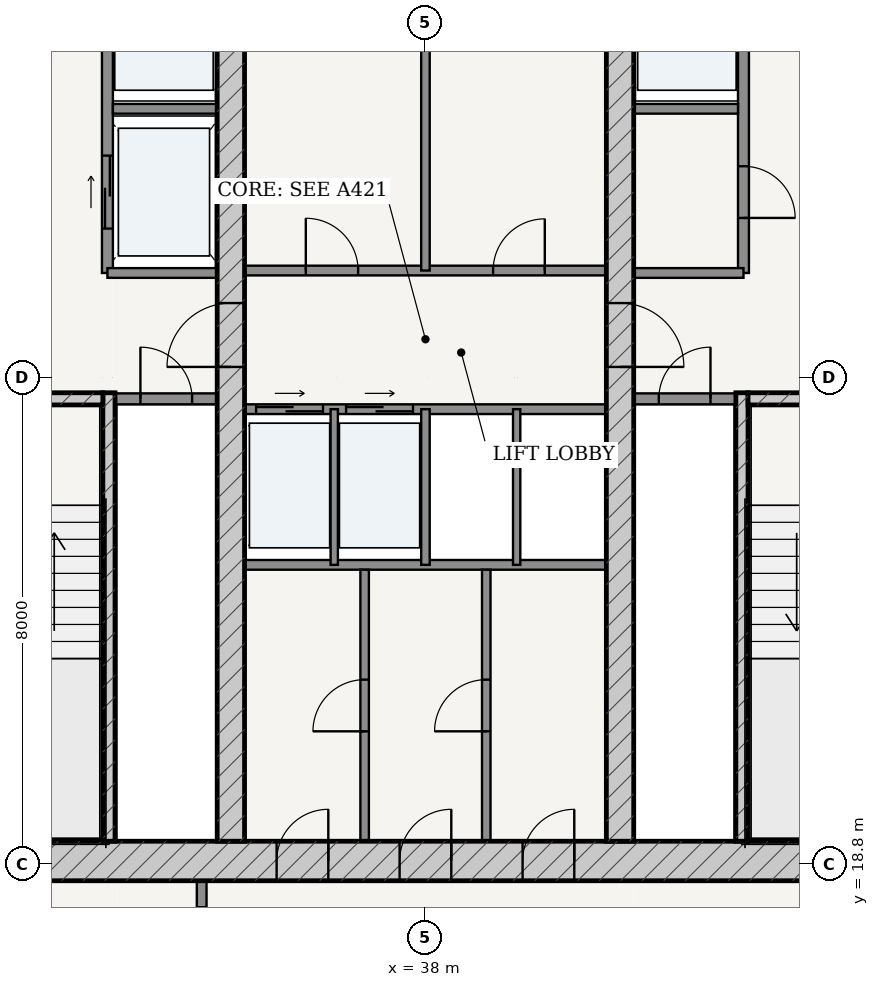
"""IFC4 building model, lengths in metres.
Left out: names, types, materials, properties, quantities, classifications, styles, units other than length and angle.
Written with IfcOpenShell. Run it as: python <this file> out.ifc"""

import sys

from ifc_helpers import new_model, si_unit, direction, frame, frame_2d, origin, place, context, subcontext, project, spatial, rectangle, extrude, source, transform, mapped, element, fill, save


model = new_model("IFC4")
c1 = context("Model", 3, precision=1e-05, world=origin(), true_north=direction((-0.2419218956, 0.970295726276)))
c2 = subcontext(c1, "Body", "Model", "MODEL_VIEW")
j1 = project(units=[si_unit("LENGTHUNIT", "METRE"), si_unit("PLANEANGLEUNIT", "RADIAN")], contexts=[c1])
p1 = place(None, origin())
s1 = spatial("IfcSite", under=j1, at=p1, CompositionType="ELEMENT")
p2 = place(p1, origin())
s2 = spatial("IfcBuilding", under=s1, at=p2, CompositionType="ELEMENT")
p3 = place(p2, frame((0.0, 0.0, 139.0)))
s3 = spatial("IfcBuildingStorey", under=s2, at=p3, CompositionType="ELEMENT", Elevation=139.0)
p4 = place(p3, frame((28.725, 18.85, 0.0), z_axis=(0.0, 0.0, 1.0), x_axis=(1.0, 0.0, 0.0)))
e1 = element("IfcWall", 1, at=p4, inside=s3, PredefinedType="SHEAR", context=c2, shape_type="SweptSolid", body=[
    extrude(rectangle(XDim=18.55, YDim=0.65, at=frame_2d((9.275, 0.0))), origin(), (0.0, 0.0, 1.0), 3.33),
])
p5 = place(p4, frame((6.827, 0.0, 0.0)))
e2 = element("IfcOpeningElement", 2, at=p5, cuts=e1, PredefinedType="OPENING", context=c2, shape_type="SweptSolid", body=[
    extrude(rectangle(XDim=0.85, YDim=2.1, at=frame_2d((0.425, 1.05))), frame((0.0, 0.335, 0.0), z_axis=(0.0, -1.0, 0.0), x_axis=(1.0, 0.0, 0.0)), (0.0, 0.0, 1.0), 0.67),
])
p6 = place(p4, frame((8.85, 0.0, 0.0)))
e3 = element("IfcOpeningElement", 3, at=p6, cuts=e1, PredefinedType="OPENING", context=c2, shape_type="SweptSolid", body=[
    extrude(rectangle(XDim=0.85, YDim=2.1, at=frame_2d((0.425, 1.05))), frame((0.0, 0.335, 0.0), z_axis=(0.0, -1.0, 0.0), x_axis=(1.0, 0.0, 0.0)), (0.0, 0.0, 1.0), 0.67),
])
p7 = place(p4, frame((10.873, 0.0, 0.0)))
e4 = element("IfcOpeningElement", 4, at=p7, cuts=e1, PredefinedType="OPENING", context=c2, shape_type="SweptSolid", body=[
    extrude(rectangle(XDim=0.85, YDim=2.1, at=frame_2d((0.425, 1.05))), frame((0.0, 0.335, 0.0), z_axis=(0.0, -1.0, 0.0), x_axis=(1.0, 0.0, 0.0)), (0.0, 0.0, 1.0), 0.67),
])
p8 = place(p3, frame((32.795, 19.175, 0.0), z_axis=(0.0, 0.0, 1.0), x_axis=(0.0, 1.0, 0.0)))
e5 = element("IfcWall", 5, at=p8, inside=s3, PredefinedType="SOLIDWALL", context=c2, shape_type="SweptSolid", body=[
    extrude(rectangle(XDim=7.375, YDim=0.2, at=frame_2d((3.688, 0.0))), origin(), (0.0, 0.0, 1.0), 3.33),
])
p9 = place(p3, frame((29.375, 26.45, 0.0), z_axis=(0.0, 0.0, 1.0), x_axis=(1.0, 0.0, 0.0)))
e6 = element("IfcWall", 6, at=p9, inside=s3, PredefinedType="SOLIDWALL", context=c2, shape_type="SweptSolid", body=[
    extrude(rectangle(XDim=3.32, YDim=0.2, at=frame_2d((1.66, 0.0))), origin(), (0.0, 0.0, 1.0), 3.33),
])
p10 = place(p9, frame((1.185, 0.0, 0.0)))
e7 = element("IfcOpeningElement", 7, at=p10, cuts=e6, PredefinedType="OPENING", context=c2, shape_type="SweptSolid", body=[
    extrude(rectangle(XDim=0.95, YDim=2.15, at=frame_2d((0.475, 1.075))), frame((0.0, 0.11, 0.0), z_axis=(0.0, -1.0, 0.0), x_axis=(1.0, 0.0, 0.0)), (0.0, 0.0, 1.0), 0.22),
])
p11 = place(p3, frame((43.205, 19.175, 0.0), z_axis=(0.0, 0.0, 1.0), x_axis=(0.0, 1.0, 0.0)))
e8 = element("IfcWall", 8, at=p11, inside=s3, PredefinedType="SOLIDWALL", context=c2, shape_type="SweptSolid", body=[
    extrude(rectangle(XDim=7.375, YDim=0.2, at=frame_2d((3.688, 0.0))), origin(), (0.0, 0.0, 1.0), 3.33),
])
p12 = place(p3, frame((43.305, 26.45, 0.0), z_axis=(0.0, 0.0, 1.0), x_axis=(1.0, 0.0, 0.0)))
e9 = element("IfcWall", 9, at=p12, inside=s3, PredefinedType="SOLIDWALL", context=c2, shape_type="SweptSolid", body=[
    extrude(rectangle(XDim=3.32, YDim=0.2, at=frame_2d((1.66, 0.0))), origin(), (0.0, 0.0, 1.0), 3.33),
])
p13 = place(p12, frame((1.185, 0.0, 0.0)))
e10 = element("IfcOpeningElement", 10, at=p13, cuts=e9, PredefinedType="OPENING", context=c2, shape_type="SweptSolid", body=[
    extrude(rectangle(XDim=0.95, YDim=2.15, at=frame_2d((0.475, 1.075))), frame((0.0, 0.11, 0.0), z_axis=(0.0, -1.0, 0.0), x_axis=(1.0, 0.0, 0.0)), (0.0, 0.0, 1.0), 0.22),
])
p14 = place(p3, frame((34.8, 19.175, 0.0), z_axis=(0.0, 0.0, 1.0), x_axis=(0.0, 1.0, 0.0)))
e11 = element("IfcWall", 11, at=p14, inside=s3, PredefinedType="SHEAR", context=c2, shape_type="SweptSolid", body=[
    extrude(rectangle(XDim=15.25, YDim=0.45, at=frame_2d((7.625, 0.0))), origin(), (0.0, 0.0, 1.0), 3.33),
])
p15 = place(p14, frame((7.8, 0.0, 0.0)))
e12 = element("IfcOpeningElement", 12, at=p15, cuts=e11, PredefinedType="OPENING", context=c2, shape_type="SweptSolid", body=[
    extrude(rectangle(XDim=1.05, YDim=2.15, at=frame_2d((0.525, 1.075))), frame((0.0, 0.235, 0.0), z_axis=(0.0, -1.0, 0.0), x_axis=(1.0, 0.0, 0.0)), (0.0, 0.0, 1.0), 0.47),
])
p16 = place(p3, frame((41.2, 19.175, 0.0), z_axis=(0.0, 0.0, 1.0), x_axis=(0.0, 1.0, 0.0)))
e13 = element("IfcWall", 13, at=p16, inside=s3, PredefinedType="SHEAR", context=c2, shape_type="SweptSolid", body=[
    extrude(rectangle(XDim=15.25, YDim=0.45, at=frame_2d((7.625, 0.0))), origin(), (0.0, 0.0, 1.0), 3.33),
])
p17 = place(p16, frame((7.8, 0.0, 0.0)))
e14 = element("IfcOpeningElement", 14, at=p17, cuts=e13, PredefinedType="OPENING", context=c2, shape_type="SweptSolid", body=[
    extrude(rectangle(XDim=1.05, YDim=2.15, at=frame_2d((0.525, 1.075))), frame((0.0, 0.235, 0.0), z_axis=(0.0, -1.0, 0.0), x_axis=(1.0, 0.0, 0.0)), (0.0, 0.0, 1.0), 0.47),
])
p18 = place(p3, frame((32.9, 26.45, 0.0), z_axis=(0.0, 0.0, 1.0), x_axis=(1.0, 0.0, 0.0)))
e15 = element("IfcWall", 15, at=p18, inside=s3, PredefinedType="PARTITIONING", context=c2, shape_type="SweptSolid", body=[
    extrude(rectangle(XDim=1.675, YDim=0.18, at=frame_2d((0.837, 0.0))), origin(), (0.0, 0.0, 1.0), 3.33),
])
p19 = place(p18, frame((0.413, 0.0, 0.0)))
e16 = element("IfcOpeningElement", 16, at=p19, cuts=e15, PredefinedType="OPENING", context=c2, shape_type="SweptSolid", body=[
    extrude(rectangle(XDim=0.85, YDim=2.1, at=frame_2d((0.425, 1.05))), frame((0.0, 0.1, 0.0), z_axis=(0.0, -1.0, 0.0), x_axis=(1.0, 0.0, 0.0)), (0.0, 0.0, 1.0), 0.2),
])
p20 = place(p3, frame((41.425, 26.45, 0.0), z_axis=(0.0, 0.0, 1.0), x_axis=(1.0, 0.0, 0.0)))
e17 = element("IfcWall", 17, at=p20, inside=s3, PredefinedType="PARTITIONING", context=c2, shape_type="SweptSolid", body=[
    extrude(rectangle(XDim=1.675, YDim=0.18, at=frame_2d((0.837, 0.0))), origin(), (0.0, 0.0, 1.0), 3.33),
])
p21 = place(p20, frame((0.413, 0.0, 0.0)))
e18 = element("IfcOpeningElement", 18, at=p21, cuts=e17, PredefinedType="OPENING", context=c2, shape_type="SweptSolid", body=[
    extrude(rectangle(XDim=0.85, YDim=2.1, at=frame_2d((0.425, 1.05))), frame((0.0, 0.1, 0.0), z_axis=(0.0, -1.0, 0.0), x_axis=(1.0, 0.0, 0.0)), (0.0, 0.0, 1.0), 0.2),
])
p22 = place(p3, frame((32.77, 28.52, 0.0), z_axis=(0.0, 0.0, 1.0), x_axis=(0.0, 1.0, 0.0)))
e19 = element("IfcWall", 19, at=p22, inside=s3, PredefinedType="PARTITIONING", context=c2, shape_type="SweptSolid", body=[
    extrude(rectangle(XDim=5.905, YDim=0.18, at=frame_2d((2.953, 0.0))), origin(), (0.0, 0.0, 1.0), 3.33),
])
p23 = place(p22, frame((3.655, 0.0, 0.0)))
e20 = element("IfcOpeningElement", 20, at=p23, cuts=e19, PredefinedType="OPENING", context=c2, shape_type="SweptSolid", body=[
    extrude(rectangle(XDim=1.15, YDim=2.2, at=frame_2d((0.575, 1.1))), frame((0.0, 0.1, 0.0), z_axis=(0.0, -1.0, 0.0), x_axis=(1.0, 0.0, 0.0)), (0.0, 0.0, 1.0), 0.2),
])
p24 = place(p22, frame((0.73, 0.0, 0.0)))
e21 = element("IfcOpeningElement", 21, at=p24, cuts=e19, PredefinedType="OPENING", context=c2, shape_type="SweptSolid", body=[
    extrude(rectangle(XDim=1.2, YDim=2.25, at=frame_2d((0.6, 1.125))), frame((0.0, 0.1, 0.0), z_axis=(0.0, -1.0, 0.0), x_axis=(1.0, 0.0, 0.0)), (0.0, 0.0, 1.0), 0.2),
])
p25 = place(p3, frame((32.86, 31.22, 0.0), z_axis=(0.0, 0.0, 1.0), x_axis=(1.0, 0.0, 0.0)))
e22 = element("IfcWall", 22, at=p25, inside=s3, PredefinedType="PARTITIONING", context=c2, shape_type="SweptSolid", body=[
    extrude(rectangle(XDim=1.715, YDim=0.16, at=frame_2d((0.857, 0.0))), origin(), (0.0, 0.0, 1.0), 3.33),
])
p26 = place(p3, frame((32.77, 28.52, 0.0), z_axis=(0.0, 0.0, 1.0), x_axis=(1.0, 0.0, 0.0)))
e23 = element("IfcWall", 23, at=p26, inside=s3, PredefinedType="PARTITIONING", context=c2, shape_type="SweptSolid", body=[
    extrude(rectangle(XDim=1.805, YDim=0.16, at=frame_2d((0.902, 0.0))), origin(), (0.0, 0.0, 1.0), 3.33),
])
p27 = place(p3, frame((43.23, 28.52, 0.0), z_axis=(0.0, 0.0, 1.0), x_axis=(0.0, 1.0, 0.0)))
e24 = element("IfcWall", 24, at=p27, inside=s3, PredefinedType="PARTITIONING", context=c2, shape_type="SweptSolid", body=[
    extrude(rectangle(XDim=5.905, YDim=0.18, at=frame_2d((2.953, 0.0))), origin(), (0.0, 0.0, 1.0), 3.33),
])
p28 = place(p27, frame((0.905, 0.0, 0.0)))
e25 = element("IfcOpeningElement", 25, at=p28, cuts=e24, PredefinedType="OPENING", context=c2, shape_type="SweptSolid", body=[
    extrude(rectangle(XDim=0.85, YDim=2.1, at=frame_2d((0.425, 1.05))), frame((0.0, 0.1, 0.0), z_axis=(0.0, -1.0, 0.0), x_axis=(1.0, 0.0, 0.0)), (0.0, 0.0, 1.0), 0.2),
])
p29 = place(p27, frame((3.655, 0.0, 0.0)))
e26 = element("IfcOpeningElement", 26, at=p29, cuts=e24, PredefinedType="OPENING", context=c2, shape_type="SweptSolid", body=[
    extrude(rectangle(XDim=1.15, YDim=2.2, at=frame_2d((0.575, 1.1))), frame((0.0, 0.1, 0.0), z_axis=(0.0, -1.0, 0.0), x_axis=(1.0, 0.0, 0.0)), (0.0, 0.0, 1.0), 0.2),
])
p30 = place(p3, frame((41.425, 31.22, 0.0), z_axis=(0.0, 0.0, 1.0), x_axis=(1.0, 0.0, 0.0)))
e27 = element("IfcWall", 27, at=p30, inside=s3, PredefinedType="PARTITIONING", context=c2, shape_type="SweptSolid", body=[
    extrude(rectangle(XDim=1.715, YDim=0.16, at=frame_2d((0.857, 0.0))), origin(), (0.0, 0.0, 1.0), 3.33),
])
p31 = place(p3, frame((41.425, 28.52, 0.0), z_axis=(0.0, 0.0, 1.0), x_axis=(1.0, 0.0, 0.0)))
e28 = element("IfcWall", 28, at=p31, inside=s3, PredefinedType="PARTITIONING", context=c2, shape_type="SweptSolid", body=[
    extrude(rectangle(XDim=1.805, YDim=0.16, at=frame_2d((0.902, 0.0))), origin(), (0.0, 0.0, 1.0), 3.33),
])
p32 = place(p3, frame((35.025, 28.56, 0.0), z_axis=(0.0, 0.0, 1.0), x_axis=(1.0, 0.0, 0.0)))
e29 = element("IfcWall", 29, at=p32, inside=s3, PredefinedType="PARTITIONING", context=c2, shape_type="SweptSolid", body=[
    extrude(rectangle(XDim=5.95, YDim=0.16, at=frame_2d((2.975, 0.0))), origin(), (0.0, 0.0, 1.0), 3.33),
])
p33 = place(p32, frame((1.008, 0.0, 0.0)))
e30 = element("IfcOpeningElement", 30, at=p33, cuts=e29, PredefinedType="OPENING", context=c2, shape_type="SweptSolid", body=[
    extrude(rectangle(XDim=0.86, YDim=2.1, at=frame_2d((0.43, 1.05))), frame((0.0, 0.09, 0.0), z_axis=(0.0, -1.0, 0.0), x_axis=(1.0, 0.0, 0.0)), (0.0, 0.0, 1.0), 0.18),
])
p34 = place(p32, frame((4.087, 0.0, 0.0)))
e31 = element("IfcOpeningElement", 31, at=p34, cuts=e29, PredefinedType="OPENING", context=c2, shape_type="SweptSolid", body=[
    extrude(rectangle(XDim=0.85, YDim=2.1, at=frame_2d((0.425, 1.05))), frame((0.0, 0.09, 0.0), z_axis=(0.0, -1.0, 0.0), x_axis=(1.0, 0.0, 0.0)), (0.0, 0.0, 1.0), 0.18),
])
p35 = place(p3, frame((38.0, 28.56, 0.0), z_axis=(0.0, 0.0, 1.0), x_axis=(0.0, 1.0, 0.0)))
e32 = element("IfcWall", 32, at=p35, inside=s3, PredefinedType="PARTITIONING", context=c2, shape_type="SweptSolid", body=[
    extrude(rectangle(XDim=5.865, YDim=0.14, at=frame_2d((2.933, 0.0))), origin(), (0.0, 0.0, 1.0), 3.33),
])
p36 = place(p3, frame((35.025, 26.28, 0.0), z_axis=(0.0, 0.0, 1.0), x_axis=(1.0, 0.0, 0.0)))
e33 = element("IfcWall", 33, at=p36, inside=s3, PredefinedType="PARTITIONING", context=c2, shape_type="SweptSolid", body=[
    extrude(rectangle(XDim=5.95, YDim=0.16, at=frame_2d((2.975, 0.0))), origin(), (0.0, 0.0, 1.0), 3.33),
])
p37 = place(p36, frame((0.19, 0.0, 0.0)))
e34 = element("IfcOpeningElement", 34, at=p37, cuts=e33, PredefinedType="OPENING", context=c2, shape_type="SweptSolid", body=[
    extrude(rectangle(XDim=1.1, YDim=2.2, at=frame_2d((0.55, 1.1))), frame((0.0, 0.09, 0.0), z_axis=(0.0, -1.0, 0.0), x_axis=(1.0, 0.0, 0.0)), (0.0, 0.0, 1.0), 0.18),
])
p38 = place(p36, frame((1.67, 0.0, 0.0)))
e35 = element("IfcOpeningElement", 35, at=p38, cuts=e33, PredefinedType="OPENING", context=c2, shape_type="SweptSolid", body=[
    extrude(rectangle(XDim=1.1, YDim=2.2, at=frame_2d((0.55, 1.1))), frame((0.0, 0.09, 0.0), z_axis=(0.0, -1.0, 0.0), x_axis=(1.0, 0.0, 0.0)), (0.0, 0.0, 1.0), 0.18),
])
p39 = place(p3, frame((35.025, 23.72, 0.0), z_axis=(0.0, 0.0, 1.0), x_axis=(1.0, 0.0, 0.0)))
e36 = element("IfcWall", 36, at=p39, inside=s3, PredefinedType="PARTITIONING", context=c2, shape_type="SweptSolid", body=[
    extrude(rectangle(XDim=5.95, YDim=0.16, at=frame_2d((2.975, 0.0))), origin(), (0.0, 0.0, 1.0), 3.33),
])
p40 = place(p3, frame((36.5, 23.72, 0.0), z_axis=(0.0, 0.0, 1.0), x_axis=(0.0, 1.0, 0.0)))
e37 = element("IfcWall", 37, at=p40, inside=s3, PredefinedType="PARTITIONING", context=c2, shape_type="SweptSolid", body=[
    extrude(rectangle(XDim=2.56, YDim=0.12, at=frame_2d((1.28, 0.0))), origin(), (0.0, 0.0, 1.0), 3.33),
])
p41 = place(p3, frame((38.0, 23.72, 0.0), z_axis=(0.0, 0.0, 1.0), x_axis=(0.0, 1.0, 0.0)))
e38 = element("IfcWall", 38, at=p41, inside=s3, PredefinedType="PARTITIONING", context=c2, shape_type="SweptSolid", body=[
    extrude(rectangle(XDim=2.56, YDim=0.14, at=frame_2d((1.28, 0.0))), origin(), (0.0, 0.0, 1.0), 3.33),
])
p42 = place(p3, frame((39.5, 23.72, 0.0), z_axis=(0.0, 0.0, 1.0), x_axis=(0.0, 1.0, 0.0)))
e39 = element("IfcWall", 39, at=p42, inside=s3, PredefinedType="PARTITIONING", context=c2, shape_type="SweptSolid", body=[
    extrude(rectangle(XDim=2.56, YDim=0.12, at=frame_2d((1.28, 0.0))), origin(), (0.0, 0.0, 1.0), 3.33),
])
p43 = place(p3, frame((37.0, 19.175, 0.0), z_axis=(0.0, 0.0, 1.0), x_axis=(0.0, 1.0, 0.0)))
e40 = element("IfcWall", 40, at=p43, inside=s3, PredefinedType="PARTITIONING", context=c2, shape_type="SweptSolid", body=[
    extrude(rectangle(XDim=4.465, YDim=0.14, at=frame_2d((2.232, 0.0))), origin(), (0.0, 0.0, 1.0), 3.33),
])
p44 = place(p43, frame((1.808, 0.0, 0.0)))
e41 = element("IfcOpeningElement", 41, at=p44, cuts=e40, PredefinedType="OPENING", context=c2, shape_type="SweptSolid", body=[
    extrude(rectangle(XDim=0.85, YDim=2.1, at=frame_2d((0.425, 1.05))), frame((0.0, 0.08, 0.0), z_axis=(0.0, -1.0, 0.0), x_axis=(1.0, 0.0, 0.0)), (0.0, 0.0, 1.0), 0.16),
])
p45 = place(p3, frame((39.0, 19.175, 0.0), z_axis=(0.0, 0.0, 1.0), x_axis=(0.0, 1.0, 0.0)))
e42 = element("IfcWall", 42, at=p45, inside=s3, PredefinedType="PARTITIONING", context=c2, shape_type="SweptSolid", body=[
    extrude(rectangle(XDim=4.465, YDim=0.14, at=frame_2d((2.232, 0.0))), origin(), (0.0, 0.0, 1.0), 3.33),
])
p46 = place(p45, frame((1.808, 0.0, 0.0)))
e43 = element("IfcOpeningElement", 43, at=p46, cuts=e42, PredefinedType="OPENING", context=c2, shape_type="SweptSolid", body=[
    extrude(rectangle(XDim=0.85, YDim=2.1, at=frame_2d((0.425, 1.05))), frame((0.0, 0.08, 0.0), z_axis=(0.0, -1.0, 0.0), x_axis=(1.0, 0.0, 0.0)), (0.0, 0.0, 1.0), 0.16),
])
p47 = place(p3, frame((34.32, 16.675, 0.0), z_axis=(0.0, 0.0, 1.0), x_axis=(0.0, 1.0, 0.0)))
e44 = element("IfcWall", 44, at=p47, inside=s3, PredefinedType="PARTITIONING", context=c2, shape_type="SweptSolid", body=[
    extrude(rectangle(XDim=1.85, YDim=0.16, at=frame_2d((0.925, 0.0))), origin(), (0.0, 0.0, 1.0), 3.33),
])
p48 = place(p47, frame((0.435, 0.0, 0.0)))
e45 = element("IfcOpeningElement", 45, at=p48, cuts=e44, PredefinedType="OPENING", context=c2, shape_type="SweptSolid", body=[
    extrude(rectangle(XDim=0.98, YDim=2.2, at=frame_2d((0.49, 1.1))), frame((0.0, 0.09, 0.0), z_axis=(0.0, -1.0, 0.0), x_axis=(1.0, 0.0, 0.0)), (0.0, 0.0, 1.0), 0.18),
])
m1 = source(origin(), c2, "Body", "SweptSolid", [
    extrude(rectangle(XDim=1.05, YDim=2.15, at=frame_2d((0.525, 1.075))), frame((0.0, 0.025, 0.0), z_axis=(0.0, -1.0, 0.0), x_axis=(1.0, 0.0, 0.0)), (0.0, 0.0, 1.0), 0.05),
])
p49 = place(p15, origin())
e46 = element("IfcDoor", 46, at=p49, inside=s3, OperationType="SINGLE_SWING_LEFT", PredefinedType="DOOR", context=c2, shape_type="MappedRepresentation", body=[
    mapped(m1, transform((0.0, 0.0, 0.0), scale=1.0)),
])
fill(e12, e46)
p50 = place(p17, frame((1.05, 0.0, 0.0), z_axis=(0.0, 0.0, 1.0), x_axis=(-1.0, 0.0, 0.0)))
e47 = element("IfcDoor", 47, at=p50, inside=s3, OperationType="SINGLE_SWING_RIGHT", PredefinedType="DOOR", context=c2, shape_type="MappedRepresentation", body=[
    mapped(m1, transform((0.0, 0.0, 0.0), scale=1.0)),
])
fill(e14, e47)
m2 = source(origin(), c2, "Body", "SweptSolid", [
    extrude(rectangle(XDim=0.85, YDim=2.1, at=frame_2d((0.425, 1.05))), frame((0.0, 0.025, 0.0), z_axis=(0.0, -1.0, 0.0), x_axis=(1.0, 0.0, 0.0)), (0.0, 0.0, 1.0), 0.05),
])
p51 = place(p19, origin())
e48 = element("IfcDoor", 48, at=p51, inside=s3, OperationType="SINGLE_SWING_LEFT", PredefinedType="DOOR", context=c2, shape_type="MappedRepresentation", body=[
    mapped(m2, transform((0.0, 0.0, 0.0), scale=1.0)),
])
fill(e16, e48)
p52 = place(p21, origin())
e49 = element("IfcDoor", 49, at=p52, inside=s3, OperationType="SINGLE_SWING_RIGHT", PredefinedType="DOOR", context=c2, shape_type="MappedRepresentation", body=[
    mapped(m2, transform((0.0, 0.0, 0.0), scale=1.0)),
])
fill(e18, e49)
p53 = place(p28, frame((0.85, 0.0, 0.0), z_axis=(0.0, 0.0, 1.0), x_axis=(-1.0, 0.0, 0.0)))
e50 = element("IfcDoor", 50, at=p53, inside=s3, OperationType="SINGLE_SWING_RIGHT", PredefinedType="DOOR", context=c2, shape_type="MappedRepresentation", body=[
    mapped(m2, transform((0.0, 0.0, 0.0), scale=1.0)),
])
fill(e25, e50)
m3 = source(origin(), c2, "Body", "SweptSolid", [
    extrude(rectangle(XDim=0.86, YDim=2.1, at=frame_2d((0.43, 1.05))), frame((0.0, 0.025, 0.0), z_axis=(0.0, -1.0, 0.0), x_axis=(1.0, 0.0, 0.0)), (0.0, 0.0, 1.0), 0.05),
])
p54 = place(p33, origin())
e51 = element("IfcDoor", 51, at=p54, inside=s3, OperationType="SINGLE_SWING_LEFT", PredefinedType="DOOR", context=c2, shape_type="MappedRepresentation", body=[
    mapped(m3, transform((0.0, 0.0, 0.0), scale=1.0)),
])
fill(e30, e51)
p55 = place(p34, origin())
e52 = element("IfcDoor", 52, at=p55, inside=s3, OperationType="SINGLE_SWING_RIGHT", PredefinedType="DOOR", context=c2, shape_type="MappedRepresentation", body=[
    mapped(m2, transform((0.0, 0.0, 0.0), scale=1.0)),
])
fill(e31, e52)
p56 = place(p5, origin())
e53 = element("IfcDoor", 53, at=p56, inside=s3, OperationType="SINGLE_SWING_RIGHT", PredefinedType="DOOR", context=c2, shape_type="MappedRepresentation", body=[
    mapped(m2, transform((0.0, 0.0, 0.0), scale=1.0)),
])
fill(e2, e53)
p57 = place(p6, origin())
e54 = element("IfcDoor", 54, at=p57, inside=s3, OperationType="SINGLE_SWING_RIGHT", PredefinedType="DOOR", context=c2, shape_type="MappedRepresentation", body=[
    mapped(m2, transform((0.0, 0.0, 0.0), scale=1.0)),
])
fill(e3, e54)
p58 = place(p7, origin())
e55 = element("IfcDoor", 55, at=p58, inside=s3, OperationType="SINGLE_SWING_RIGHT", PredefinedType="DOOR", context=c2, shape_type="MappedRepresentation", body=[
    mapped(m2, transform((0.0, 0.0, 0.0), scale=1.0)),
])
fill(e4, e55)
p59 = place(p44, origin())
e56 = element("IfcDoor", 56, at=p59, inside=s3, OperationType="SINGLE_SWING_LEFT", PredefinedType="DOOR", context=c2, shape_type="MappedRepresentation", body=[
    mapped(m2, transform((0.0, 0.0, 0.0), scale=1.0)),
])
fill(e41, e56)
p60 = place(p46, origin())
e57 = element("IfcDoor", 57, at=p60, inside=s3, OperationType="SINGLE_SWING_LEFT", PredefinedType="DOOR", context=c2, shape_type="MappedRepresentation", body=[
    mapped(m2, transform((0.0, 0.0, 0.0), scale=1.0)),
])
fill(e43, e57)
m4 = source(origin(), c2, "Body", "SweptSolid", [
    extrude(rectangle(XDim=1.2, YDim=2.25, at=frame_2d((0.6, 1.125))), frame((0.0, 0.025, 0.0), z_axis=(0.0, -1.0, 0.0), x_axis=(1.0, 0.0, 0.0)), (0.0, 0.0, 1.0), 0.05),
])
p61 = place(p24, origin())
e58 = element("IfcDoor", 58, at=p61, inside=s3, OperationType="DOUBLE_DOOR_SLIDING", PredefinedType="DOOR", context=c2, shape_type="MappedRepresentation", body=[
    mapped(m4, transform((0.0, 0.0, 0.0), scale=1.0)),
])
fill(e21, e58)
m5 = source(origin(), c2, "Body", "SweptSolid", [
    extrude(rectangle(XDim=1.1, YDim=2.2, at=frame_2d((0.55, 1.1))), frame((0.0, 0.025, 0.0), z_axis=(0.0, -1.0, 0.0), x_axis=(1.0, 0.0, 0.0)), (0.0, 0.0, 1.0), 0.05),
])
p62 = place(p37, origin())
e59 = element("IfcDoor", 59, at=p62, inside=s3, OperationType="DOUBLE_DOOR_SLIDING", PredefinedType="DOOR", context=c2, shape_type="MappedRepresentation", body=[
    mapped(m5, transform((0.0, 0.0, 0.0), scale=1.0)),
])
fill(e34, e59)
p63 = place(p38, origin())
e60 = element("IfcDoor", 60, at=p63, inside=s3, OperationType="DOUBLE_DOOR_SLIDING", PredefinedType="DOOR", context=c2, shape_type="MappedRepresentation", body=[
    mapped(m5, transform((0.0, 0.0, 0.0), scale=1.0)),
])
fill(e35, e60)
m6 = source(origin(), c2, "Body", "SweptSolid", [
    extrude(rectangle(XDim=0.98, YDim=2.2, at=frame_2d((0.49, 1.1))), frame((0.0, 0.025, 0.0), z_axis=(0.0, -1.0, 0.0), x_axis=(1.0, 0.0, 0.0)), (0.0, 0.0, 1.0), 0.05),
])
p64 = place(p48, origin())
e61 = element("IfcDoor", 61, at=p64, inside=s3, OperationType="SINGLE_SWING_LEFT", PredefinedType="DOOR", context=c2, shape_type="MappedRepresentation", body=[
    mapped(m6, transform((0.0, 0.0, 0.0), scale=1.0)),
])
fill(e45, e61)
save(model, sys.argv[1])
